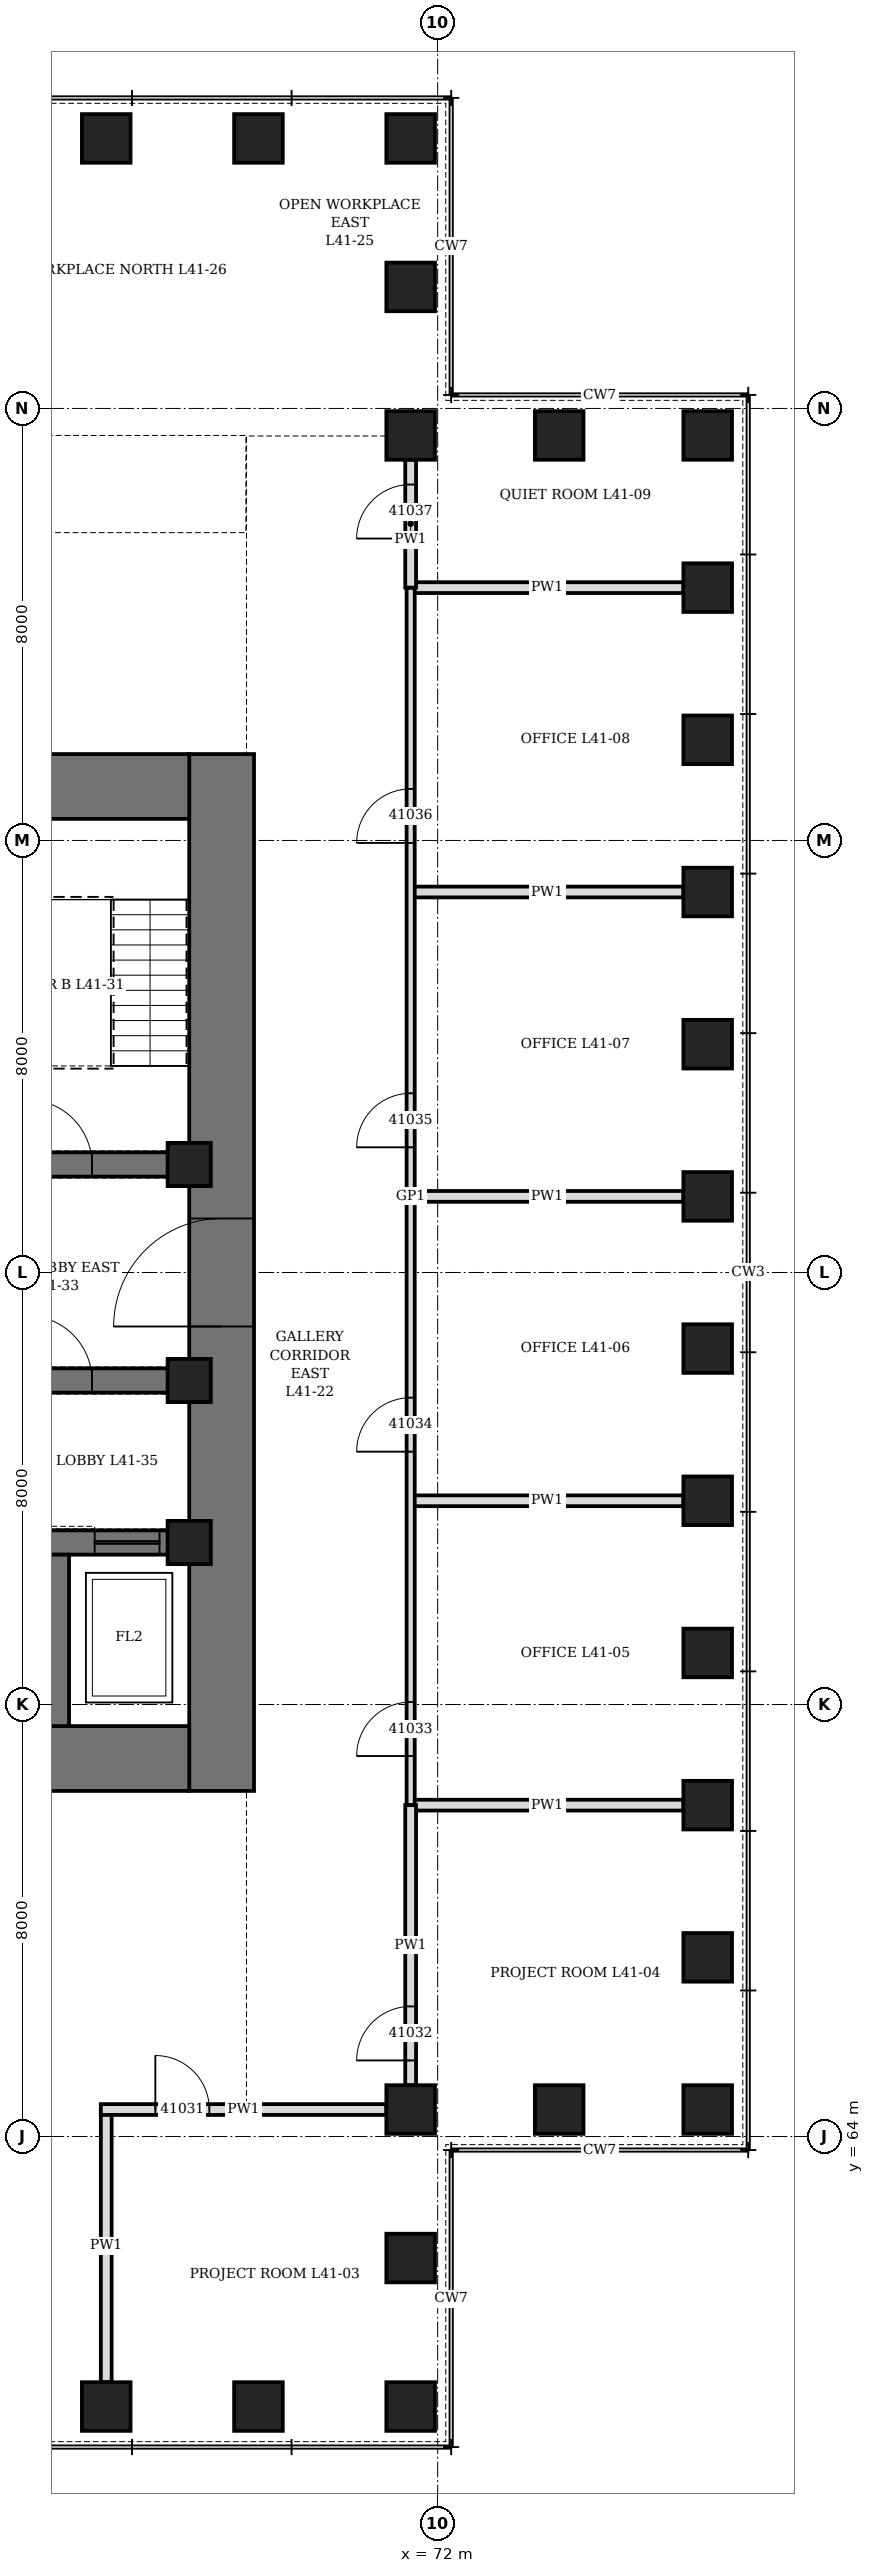
"""IFC4 building model, lengths in metres.
Left out: names, types, materials, properties, quantities, classifications, styles, units other than length and angle.
Written with IfcOpenShell. Run it as: python <this file> out.ifc"""

import sys

from ifc_helpers import new_model, si_unit, direction, frame, frame_2d, origin, origin_2d, place, context, subcontext, project, spatial, rectangle, hollow_rectangle, extrude, element, fill, save


model = new_model("IFC4")
c1 = context("Model", 3, precision=1e-05, world=origin(), true_north=direction((0.0, 1.0)))
c2 = subcontext(c1, "Body", "Model", "MODEL_VIEW")
j1 = project(units=[si_unit("LENGTHUNIT", "METRE"), si_unit("PLANEANGLEUNIT", "RADIAN")], contexts=[c1])
p1 = place(None, origin())
s1 = spatial("IfcSite", under=j1, at=p1, CompositionType="ELEMENT")
p2 = place(p1, origin())
s2 = spatial("IfcBuilding", under=s1, at=p2, CompositionType="ELEMENT")
p3 = place(p2, frame((0.0, 0.0, 185.5)))
s3 = spatial("IfcBuildingStorey", under=s2, at=p3, CompositionType="ELEMENT", Elevation=185.5)
for number, where, z_axis, x_axis in (
    (1, (65.864, 59.0, 0.0), (0.0, 0.0, 1.0), (1.0, 0.0, 0.0)),
    (2, (68.682, 59.0, 0.0), (0.0, 0.0, 1.0), (1.0, 0.0, 0.0)),
    (3, (71.5, 59.0, 0.0), (0.0, 0.0, 1.0), (0.0, 1.0, 0.0)),
    (4, (71.5, 61.75, 0.0), (0.0, 0.0, 1.0), (0.0, 1.0, 0.0)),
    (5, (71.5, 64.5, 0.0), (0.0, 0.0, 1.0), (1.0, 0.0, 0.0)),
    (6, (74.25, 64.5, 0.0), (0.0, 0.0, 1.0), (1.0, 0.0, 0.0)),
    (7, (77.0, 64.5, 0.0), (0.0, 0.0, 1.0), (0.0, 1.0, 0.0)),
    (8, (77.0, 67.318, 0.0), (0.0, 0.0, 1.0), (0.0, 1.0, 0.0)),
    (9, (77.0, 70.136, 0.0), (0.0, 0.0, 1.0), (0.0, 1.0, 0.0)),
    (10, (77.0, 72.955, 0.0), (0.0, 0.0, 1.0), (0.0, 1.0, 0.0)),
    (11, (77.0, 75.773, 0.0), (0.0, 0.0, 1.0), (0.0, 1.0, 0.0)),
    (12, (77.0, 78.591, 0.0), (0.0, 0.0, 1.0), (0.0, 1.0, 0.0)),
    (13, (77.0, 81.409, 0.0), (0.0, 0.0, 1.0), (0.0, 1.0, 0.0)),
    (14, (77.0, 84.227, 0.0), (0.0, 0.0, 1.0), (0.0, 1.0, 0.0)),
    (15, (77.0, 87.045, 0.0), (0.0, 0.0, 1.0), (0.0, 1.0, 0.0)),
    (16, (77.0, 89.864, 0.0), (0.0, 0.0, 1.0), (0.0, 1.0, 0.0)),
    (17, (77.0, 92.682, 0.0), (0.0, 0.0, 1.0), (0.0, 1.0, 0.0)),
    (18, (77.0, 95.5, 0.0), (0.0, 0.0, 1.0), (1.0, 0.0, 0.0)),
    (19, (74.25, 95.5, 0.0), (0.0, 0.0, 1.0), (1.0, 0.0, 0.0)),
    (20, (71.5, 95.5, 0.0), (0.0, 0.0, 1.0), (0.0, 1.0, 0.0)),
    (21, (71.5, 98.25, 0.0), (0.0, 0.0, 1.0), (0.0, 1.0, 0.0)),
    (22, (71.5, 101.0, 0.0), (0.0, 0.0, 1.0), (1.0, 0.0, 0.0)),
    (23, (68.682, 101.0, 0.0), (0.0, 0.0, 1.0), (1.0, 0.0, 0.0)),
    (24, (65.864, 101.0, 0.0), (0.0, 0.0, 1.0), (1.0, 0.0, 0.0)),
):
    element("IfcColumn", number, at=place(p3, frame(where, z_axis=z_axis, x_axis=x_axis)), inside=s3, PredefinedType="COLUMN", context=c2, shape_type="SweptSolid", body=[
        extrude(hollow_rectangle(XDim=0.9, YDim=0.9, WallThickness=0.12, at=origin_2d()), origin(), (0.0, 0.0, 1.0), 4.2),
    ])
p4 = place(p3, frame((68.0, 70.4, 0.0), z_axis=(0.0, 0.0, 1.0), x_axis=(0.0, 1.0, 0.0)))
e25 = element("IfcWall", 25, at=p4, inside=s3, PredefinedType="SHEAR", context=c2, shape_type="SweptSolid", body=[
    extrude(rectangle(XDim=19.2, YDim=1.2, at=frame_2d((9.6, 0.0))), origin(), (0.0, 0.0, 1.0), 4.2),
])
p5 = place(p4, frame((8.6, 0.0, 0.0)))
e26 = element("IfcOpeningElement", 26, at=p5, cuts=e25, PredefinedType="OPENING", context=c2, shape_type="SweptSolid", body=[
    extrude(rectangle(XDim=2.0, YDim=2.4, at=frame_2d((1.0, 1.2))), frame((0.0, 0.61, 0.0), z_axis=(0.0, -1.0, 0.0), x_axis=(1.0, 0.0, 0.0)), (0.0, 0.0, 1.0), 1.22),
])
p6 = place(p3, frame((44.6, 71.0, 0.0), z_axis=(0.0, 0.0, 1.0), x_axis=(1.0, 0.0, 0.0)))
e27 = element("IfcWall", 27, at=p6, inside=s3, PredefinedType="SHEAR", context=c2, shape_type="SweptSolid", body=[
    extrude(rectangle(XDim=22.8, YDim=1.2, at=frame_2d((11.4, 0.0))), origin(), (0.0, 0.0, 1.0), 4.2),
])
p7 = place(p6, frame((6.35, 0.0, 0.0)))
e28 = element("IfcOpeningElement", 28, at=p7, cuts=e27, PredefinedType="OPENING", context=c2, shape_type="SweptSolid", body=[
    extrude(rectangle(XDim=1.1, YDim=2.2, at=frame_2d((0.55, 1.1))), frame((0.0, 0.61, 0.0), z_axis=(0.0, -1.0, 0.0), x_axis=(1.0, 0.0, 0.0)), (0.0, 0.0, 1.0), 1.22),
])
p8 = place(p6, frame((9.35, 0.0, 0.0)))
e29 = element("IfcOpeningElement", 29, at=p8, cuts=e27, PredefinedType="OPENING", context=c2, shape_type="SweptSolid", body=[
    extrude(rectangle(XDim=1.1, YDim=2.2, at=frame_2d((0.55, 1.1))), frame((0.0, 0.61, 0.0), z_axis=(0.0, -1.0, 0.0), x_axis=(1.0, 0.0, 0.0)), (0.0, 0.0, 1.0), 1.22),
])
p9 = place(p6, frame((12.35, 0.0, 0.0)))
e30 = element("IfcOpeningElement", 30, at=p9, cuts=e27, PredefinedType="OPENING", context=c2, shape_type="SweptSolid", body=[
    extrude(rectangle(XDim=1.1, YDim=2.2, at=frame_2d((0.55, 1.1))), frame((0.0, 0.61, 0.0), z_axis=(0.0, -1.0, 0.0), x_axis=(1.0, 0.0, 0.0)), (0.0, 0.0, 1.0), 1.22),
])
p10 = place(p6, frame((15.35, 0.0, 0.0)))
e31 = element("IfcOpeningElement", 31, at=p10, cuts=e27, PredefinedType="OPENING", context=c2, shape_type="SweptSolid", body=[
    extrude(rectangle(XDim=1.1, YDim=2.2, at=frame_2d((0.55, 1.1))), frame((0.0, 0.61, 0.0), z_axis=(0.0, -1.0, 0.0), x_axis=(1.0, 0.0, 0.0)), (0.0, 0.0, 1.0), 1.22),
])
p11 = place(p3, frame((44.6, 89.0, 0.0), z_axis=(0.0, 0.0, 1.0), x_axis=(1.0, 0.0, 0.0)))
e32 = element("IfcWall", 32, at=p11, inside=s3, PredefinedType="SHEAR", context=c2, shape_type="SweptSolid", body=[
    extrude(rectangle(XDim=22.8, YDim=1.2, at=frame_2d((11.4, 0.0))), origin(), (0.0, 0.0, 1.0), 4.2),
])
p12 = place(p11, frame((6.525, 0.0, 0.0)))
e33 = element("IfcOpeningElement", 33, at=p12, cuts=e32, PredefinedType="OPENING", context=c2, shape_type="SweptSolid", body=[
    extrude(rectangle(XDim=1.0, YDim=2.1, at=frame_2d((0.5, 1.05))), frame((0.0, 0.61, 0.0), z_axis=(0.0, -1.0, 0.0), x_axis=(1.0, 0.0, 0.0)), (0.0, 0.0, 1.0), 1.22),
])
p13 = place(p11, frame((9.45, 0.0, 0.0)))
e34 = element("IfcOpeningElement", 34, at=p13, cuts=e32, PredefinedType="OPENING", context=c2, shape_type="SweptSolid", body=[
    extrude(rectangle(XDim=0.9, YDim=2.1, at=frame_2d((0.45, 1.05))), frame((0.0, 0.61, 0.0), z_axis=(0.0, -1.0, 0.0), x_axis=(1.0, 0.0, 0.0)), (0.0, 0.0, 1.0), 1.22),
])
p14 = place(p11, frame((13.012, 0.0, 0.0)))
e35 = element("IfcOpeningElement", 35, at=p14, cuts=e32, PredefinedType="OPENING", context=c2, shape_type="SweptSolid", body=[
    extrude(rectangle(XDim=0.9, YDim=2.1, at=frame_2d((0.45, 1.05))), frame((0.0, 0.61, 0.0), z_axis=(0.0, -1.0, 0.0), x_axis=(1.0, 0.0, 0.0)), (0.0, 0.0, 1.0), 1.22),
])
p15 = place(p3, frame((62.225, 75.0, 0.0), z_axis=(0.0, 0.0, 1.0), x_axis=(1.0, 0.0, 0.0)))
e36 = element("IfcWall", 36, at=p15, inside=s3, PredefinedType="SHEAR", context=c2, shape_type="SweptSolid", body=[
    extrude(rectangle(XDim=5.175, YDim=0.45, at=frame_2d((2.587, 0.0))), origin(), (0.0, 0.0, 1.0), 4.2),
])
p16 = place(p15, frame((0.675, 0.0, 0.0)))
e37 = element("IfcOpeningElement", 37, at=p16, cuts=e36, PredefinedType="OPENING", context=c2, shape_type="SweptSolid", body=[
    extrude(rectangle(XDim=1.2, YDim=2.2, at=frame_2d((0.6, 1.1))), frame((0.0, 0.235, 0.0), z_axis=(0.0, -1.0, 0.0), x_axis=(1.0, 0.0, 0.0)), (0.0, 0.0, 1.0), 0.47),
])
p17 = place(p15, frame((3.425, 0.0, 0.0)))
e38 = element("IfcOpeningElement", 38, at=p17, cuts=e36, PredefinedType="OPENING", context=c2, shape_type="SweptSolid", body=[
    extrude(rectangle(XDim=1.2, YDim=2.2, at=frame_2d((0.6, 1.1))), frame((0.0, 0.235, 0.0), z_axis=(0.0, -1.0, 0.0), x_axis=(1.0, 0.0, 0.0)), (0.0, 0.0, 1.0), 0.47),
])
p18 = place(p3, frame((62.225, 78.0, 0.0), z_axis=(0.0, 0.0, 1.0), x_axis=(1.0, 0.0, 0.0)))
e39 = element("IfcWall", 39, at=p18, inside=s3, PredefinedType="SHEAR", context=c2, shape_type="SweptSolid", body=[
    extrude(rectangle(XDim=5.175, YDim=0.45, at=frame_2d((2.587, 0.0))), origin(), (0.0, 0.0, 1.0), 4.2),
])
p19 = place(p18, frame((2.175, 0.0, 0.0)))
e40 = element("IfcOpeningElement", 40, at=p19, cuts=e39, PredefinedType="OPENING", context=c2, shape_type="SweptSolid", body=[
    extrude(rectangle(XDim=1.2, YDim=2.1, at=frame_2d((0.6, 1.05))), frame((0.0, 0.235, 0.0), z_axis=(0.0, -1.0, 0.0), x_axis=(1.0, 0.0, 0.0)), (0.0, 0.0, 1.0), 0.47),
])
p20 = place(p3, frame((62.225, 82.0, 0.0), z_axis=(0.0, 0.0, 1.0), x_axis=(1.0, 0.0, 0.0)))
e41 = element("IfcWall", 41, at=p20, inside=s3, PredefinedType="SHEAR", context=c2, shape_type="SweptSolid", body=[
    extrude(rectangle(XDim=5.175, YDim=0.45, at=frame_2d((2.587, 0.0))), origin(), (0.0, 0.0, 1.0), 4.2),
])
p21 = place(p20, frame((2.175, 0.0, 0.0)))
e42 = element("IfcOpeningElement", 42, at=p21, cuts=e41, PredefinedType="OPENING", context=c2, shape_type="SweptSolid", body=[
    extrude(rectangle(XDim=1.2, YDim=2.1, at=frame_2d((0.6, 1.05))), frame((0.0, 0.235, 0.0), z_axis=(0.0, -1.0, 0.0), x_axis=(1.0, 0.0, 0.0)), (0.0, 0.0, 1.0), 0.47),
])
p22 = place(p3, frame((65.0, 71.6, 0.0), z_axis=(0.0, 0.0, 1.0), x_axis=(0.0, 1.0, 0.0)))
e43 = element("IfcWall", 43, at=p22, inside=s3, PredefinedType="SHEAR", context=c2, shape_type="SweptSolid", body=[
    extrude(rectangle(XDim=3.175, YDim=0.35, at=frame_2d((1.587, 0.0))), origin(), (0.0, 0.0, 1.0), 4.2),
])
for number, where, z_axis, x_axis in (
    (44, (67.4, 75.0, 0.0), (0.0, 0.0, 1.0), (1.0, 0.0, 0.0)),
    (45, (67.4, 78.0, 0.0), (0.0, 0.0, 1.0), (1.0, 0.0, 0.0)),
    (46, (67.4, 82.0, 0.0), (0.0, 0.0, 1.0), (1.0, 0.0, 0.0)),
):
    element("IfcColumn", number, at=place(p3, frame(where, z_axis=z_axis, x_axis=x_axis)), inside=s3, PredefinedType="COLUMN", context=c2, shape_type="SweptSolid", body=[
        extrude(hollow_rectangle(XDim=0.8, YDim=0.8, WallThickness=0.1, at=origin_2d()), origin(), (0.0, 0.0, 1.0), 4.2),
    ])
for number, where, z_axis, x_axis in (
    (47, (65.864, 59.45, 0.0), (0.0, 0.0, 1.0), (0.0, 1.0, 0.0)),
    (48, (71.5, 70.136, 0.0), (0.0, 0.0, 1.0), (1.0, 0.0, 0.0)),
    (49, (71.5, 75.773, 0.0), (0.0, 0.0, 1.0), (1.0, 0.0, 0.0)),
    (50, (71.5, 81.409, 0.0), (0.0, 0.0, 1.0), (1.0, 0.0, 0.0)),
    (51, (71.5, 87.045, 0.0), (0.0, 0.0, 1.0), (1.0, 0.0, 0.0)),
    (52, (71.5, 92.682, 0.0), (0.0, 0.0, 1.0), (1.0, 0.0, 0.0)),
):
    element("IfcWall", number, at=place(p3, frame(where, z_axis=z_axis, x_axis=x_axis)), inside=s3, PredefinedType="PARTITIONING", context=c2, shape_type="SweptSolid", body=[
        extrude(rectangle(XDim=5.05, YDim=0.2, at=frame_2d((2.525, 0.0))), origin(), (0.0, 0.0, 1.0), 3.428),
    ])
p23 = place(p3, frame((65.764, 64.5, 0.0), z_axis=(0.0, 0.0, 1.0), x_axis=(1.0, 0.0, 0.0)))
e53 = element("IfcWall", 53, at=p23, inside=s3, PredefinedType="PARTITIONING", context=c2, shape_type="SweptSolid", body=[
    extrude(rectangle(XDim=5.286, YDim=0.2, at=frame_2d((2.643, 0.0))), origin(), (0.0, 0.0, 1.0), 4.04),
])
p24 = place(p23, frame((1.009, 0.0, 0.0)))
e54 = element("IfcOpeningElement", 54, at=p24, cuts=e53, PredefinedType="OPENING", context=c2, shape_type="SweptSolid", body=[
    extrude(rectangle(XDim=1.0, YDim=2.1, at=frame_2d((0.5, 1.05))), frame((0.0, 0.11, 0.0), z_axis=(0.0, -1.0, 0.0), x_axis=(1.0, 0.0, 0.0)), (0.0, 0.0, 1.0), 0.22),
])
p25 = place(p3, frame((71.5, 70.136, 0.0), z_axis=(0.0, 0.0, 1.0), x_axis=(0.0, 1.0, 0.0)))
e55 = element("IfcWall", 55, at=p25, inside=s3, PredefinedType="PARTITIONING", context=c2, shape_type="SweptSolid", body=[
    extrude(rectangle(XDim=22.545, YDim=0.15, at=frame_2d((11.273, 0.0))), origin(), (0.0, 0.0, 1.0), 4.04),
])
p26 = place(p25, frame((0.909, 0.0, 0.0)))
e56 = element("IfcOpeningElement", 56, at=p26, cuts=e55, PredefinedType="OPENING", context=c2, shape_type="SweptSolid", body=[
    extrude(rectangle(XDim=1.0, YDim=2.1, at=frame_2d((0.5, 1.05))), frame((0.0, 0.085, 0.0), z_axis=(0.0, -1.0, 0.0), x_axis=(1.0, 0.0, 0.0)), (0.0, 0.0, 1.0), 0.17),
])
p27 = place(p25, frame((6.545, 0.0, 0.0)))
e57 = element("IfcOpeningElement", 57, at=p27, cuts=e55, PredefinedType="OPENING", context=c2, shape_type="SweptSolid", body=[
    extrude(rectangle(XDim=1.0, YDim=2.1, at=frame_2d((0.5, 1.05))), frame((0.0, 0.085, 0.0), z_axis=(0.0, -1.0, 0.0), x_axis=(1.0, 0.0, 0.0)), (0.0, 0.0, 1.0), 0.17),
])
p28 = place(p25, frame((12.182, 0.0, 0.0)))
e58 = element("IfcOpeningElement", 58, at=p28, cuts=e55, PredefinedType="OPENING", context=c2, shape_type="SweptSolid", body=[
    extrude(rectangle(XDim=1.0, YDim=2.1, at=frame_2d((0.5, 1.05))), frame((0.0, 0.085, 0.0), z_axis=(0.0, -1.0, 0.0), x_axis=(1.0, 0.0, 0.0)), (0.0, 0.0, 1.0), 0.17),
])
p29 = place(p25, frame((17.818, 0.0, 0.0)))
e59 = element("IfcOpeningElement", 59, at=p29, cuts=e55, PredefinedType="OPENING", context=c2, shape_type="SweptSolid", body=[
    extrude(rectangle(XDim=1.0, YDim=2.1, at=frame_2d((0.5, 1.05))), frame((0.0, 0.085, 0.0), z_axis=(0.0, -1.0, 0.0), x_axis=(1.0, 0.0, 0.0)), (0.0, 0.0, 1.0), 0.17),
])
p30 = place(p3, frame((71.5, 64.95, 0.0), z_axis=(0.0, 0.0, 1.0), x_axis=(0.0, 1.0, 0.0)))
e60 = element("IfcWall", 60, at=p30, inside=s3, PredefinedType="PARTITIONING", context=c2, shape_type="SweptSolid", body=[
    extrude(rectangle(XDim=5.187, YDim=0.2, at=frame_2d((2.593, 0.0))), origin(), (0.0, 0.0, 1.0), 4.04),
])
p31 = place(p30, frame((0.459, 0.0, 0.0)))
e61 = element("IfcOpeningElement", 61, at=p31, cuts=e60, PredefinedType="OPENING", context=c2, shape_type="SweptSolid", body=[
    extrude(rectangle(XDim=1.0, YDim=2.1, at=frame_2d((0.5, 1.05))), frame((0.0, 0.11, 0.0), z_axis=(0.0, -1.0, 0.0), x_axis=(1.0, 0.0, 0.0)), (0.0, 0.0, 1.0), 0.22),
])
p32 = place(p3, frame((71.5, 92.682, 0.0), z_axis=(0.0, 0.0, 1.0), x_axis=(0.0, 1.0, 0.0)))
e62 = element("IfcWall", 62, at=p32, inside=s3, PredefinedType="PARTITIONING", context=c2, shape_type="SweptSolid", body=[
    extrude(rectangle(XDim=2.368, YDim=0.2, at=frame_2d((1.184, 0.0))), origin(), (0.0, 0.0, 1.0), 4.04),
])
p33 = place(p32, frame((0.909, 0.0, 0.0)))
e63 = element("IfcOpeningElement", 63, at=p33, cuts=e62, PredefinedType="OPENING", context=c2, shape_type="SweptSolid", body=[
    extrude(rectangle(XDim=1.0, YDim=2.1, at=frame_2d((0.5, 1.05))), frame((0.0, 0.11, 0.0), z_axis=(0.0, -1.0, 0.0), x_axis=(1.0, 0.0, 0.0)), (0.0, 0.0, 1.0), 0.22),
])
p34 = place(p21, origin())
e64 = element("IfcDoor", 64, at=p34, inside=s3, OperationType="SINGLE_SWING_LEFT", PredefinedType="DOOR", context=c2, shape_type="SweptSolid", body=[
    extrude(rectangle(XDim=1.2, YDim=2.1, at=frame_2d((0.6, 1.05))), frame((0.0, 0.225, 0.0), z_axis=(0.0, -1.0, 0.0), x_axis=(1.0, 0.0, 0.0)), (0.0, 0.0, 1.0), 0.449),
])
fill(e42, e64)
p35 = place(p5, origin())
e65 = element("IfcDoor", 65, at=p35, inside=s3, OperationType="DOUBLE_DOOR_SINGLE_SWING", PredefinedType="DOOR", context=c2, shape_type="SweptSolid", body=[
    extrude(rectangle(XDim=2.0, YDim=2.4, at=frame_2d((1.0, 1.2))), frame((0.0, 0.35, 0.0), z_axis=(0.0, -1.0, 0.0), x_axis=(1.0, 0.0, 0.0)), (0.0, 0.0, 1.0), 0.7),
])
fill(e26, e65)
p36 = place(p19, origin())
e66 = element("IfcDoor", 66, at=p36, inside=s3, OperationType="SINGLE_SWING_RIGHT", PredefinedType="DOOR", context=c2, shape_type="SweptSolid", body=[
    extrude(rectangle(XDim=1.2, YDim=2.1, at=frame_2d((0.6, 1.05))), frame((0.0, 0.225, 0.0), z_axis=(0.0, -1.0, 0.0), x_axis=(1.0, 0.0, 0.0)), (0.0, 0.0, 1.0), 0.449),
])
fill(e40, e66)
p37 = place(p17, origin())
e67 = element("IfcDoor", 67, at=p37, inside=s3, OperationType="SLIDING_TO_LEFT", PredefinedType="DOOR", context=c2, shape_type="SweptSolid", body=[
    extrude(rectangle(XDim=1.2, YDim=2.2, at=frame_2d((0.6, 1.1))), frame((0.0, 0.225, 0.0), z_axis=(0.0, -1.0, 0.0), x_axis=(1.0, 0.0, 0.0)), (0.0, 0.0, 1.0), 0.449),
])
fill(e38, e67)
p38 = place(p24, origin())
e68 = element("IfcDoor", 68, at=p38, inside=s3, OperationType="SINGLE_SWING_LEFT", PredefinedType="DOOR", context=c2, shape_type="SweptSolid", body=[
    extrude(rectangle(XDim=1.0, YDim=2.1, at=frame_2d((0.5, 1.05))), frame((0.0, 0.1, 0.0), z_axis=(0.0, -1.0, 0.0), x_axis=(1.0, 0.0, 0.0)), (0.0, 0.0, 1.0), 0.199),
])
fill(e54, e68)
p39 = place(p31, origin())
e69 = element("IfcDoor", 69, at=p39, inside=s3, OperationType="SINGLE_SWING_LEFT", PredefinedType="DOOR", context=c2, shape_type="SweptSolid", body=[
    extrude(rectangle(XDim=1.0, YDim=2.1, at=frame_2d((0.5, 1.05))), frame((0.0, 0.1, 0.0), z_axis=(0.0, -1.0, 0.0), x_axis=(1.0, 0.0, 0.0)), (0.0, 0.0, 1.0), 0.199),
])
fill(e61, e69)
p40 = place(p26, origin())
e70 = element("IfcDoor", 70, at=p40, inside=s3, OperationType="SINGLE_SWING_LEFT", PredefinedType="DOOR", context=c2, shape_type="SweptSolid", body=[
    extrude(rectangle(XDim=1.0, YDim=2.1, at=frame_2d((0.5, 1.05))), frame((0.0, 0.075, 0.0), z_axis=(0.0, -1.0, 0.0), x_axis=(1.0, 0.0, 0.0)), (0.0, 0.0, 1.0), 0.149),
])
fill(e56, e70)
p41 = place(p27, origin())
e71 = element("IfcDoor", 71, at=p41, inside=s3, OperationType="SINGLE_SWING_LEFT", PredefinedType="DOOR", context=c2, shape_type="SweptSolid", body=[
    extrude(rectangle(XDim=1.0, YDim=2.1, at=frame_2d((0.5, 1.05))), frame((0.0, 0.075, 0.0), z_axis=(0.0, -1.0, 0.0), x_axis=(1.0, 0.0, 0.0)), (0.0, 0.0, 1.0), 0.149),
])
fill(e57, e71)
p42 = place(p28, origin())
e72 = element("IfcDoor", 72, at=p42, inside=s3, OperationType="SINGLE_SWING_LEFT", PredefinedType="DOOR", context=c2, shape_type="SweptSolid", body=[
    extrude(rectangle(XDim=1.0, YDim=2.1, at=frame_2d((0.5, 1.05))), frame((0.0, 0.075, 0.0), z_axis=(0.0, -1.0, 0.0), x_axis=(1.0, 0.0, 0.0)), (0.0, 0.0, 1.0), 0.149),
])
fill(e58, e72)
p43 = place(p29, origin())
e73 = element("IfcDoor", 73, at=p43, inside=s3, OperationType="SINGLE_SWING_LEFT", PredefinedType="DOOR", context=c2, shape_type="SweptSolid", body=[
    extrude(rectangle(XDim=1.0, YDim=2.1, at=frame_2d((0.5, 1.05))), frame((0.0, 0.075, 0.0), z_axis=(0.0, -1.0, 0.0), x_axis=(1.0, 0.0, 0.0)), (0.0, 0.0, 1.0), 0.149),
])
fill(e59, e73)
p44 = place(p33, origin())
e74 = element("IfcDoor", 74, at=p44, inside=s3, OperationType="SINGLE_SWING_LEFT", PredefinedType="DOOR", context=c2, shape_type="SweptSolid", body=[
    extrude(rectangle(XDim=1.0, YDim=2.1, at=frame_2d((0.5, 1.05))), frame((0.0, 0.1, 0.0), z_axis=(0.0, -1.0, 0.0), x_axis=(1.0, 0.0, 0.0)), (0.0, 0.0, 1.0), 0.199),
])
fill(e63, e74)
save(model, sys.argv[1])
